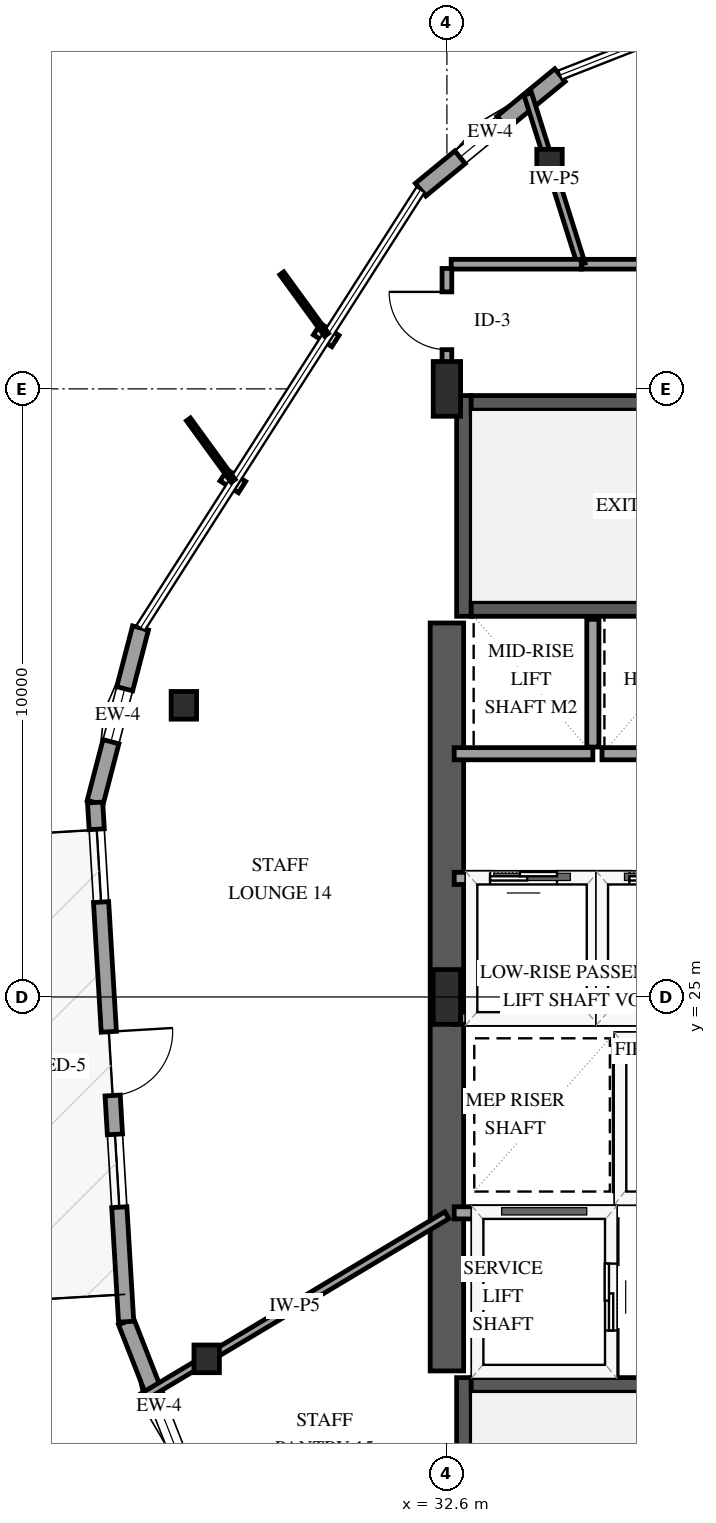
"""IFC4 building model, lengths in metres.
Left out: names, types, materials, properties, quantities, classifications, styles, units other than length and angle.
Written with IfcOpenShell. Run it as: python <this file> out.ifc"""

import sys

from ifc_helpers import new_model, si_unit, direction, frame, frame_2d, origin, origin_2d, place, context, subcontext, project, spatial, rectangle, i_section, extrude, element, fill, save


model = new_model("IFC4")
c1 = context("Model", 3, precision=1e-05, world=origin(), true_north=direction((0.0, 1.0)))
c2 = subcontext(c1, "Body", "Model", "MODEL_VIEW")
j1 = project(units=[si_unit("LENGTHUNIT", "METRE"), si_unit("PLANEANGLEUNIT", "RADIAN")], contexts=[c1])
p1 = place(None, origin())
s1 = spatial("IfcSite", under=j1, at=p1, CompositionType="ELEMENT")
p2 = place(p1, origin())
s2 = spatial("IfcBuilding", under=s1, at=p2, CompositionType="ELEMENT")
p3 = place(p2, frame((0.0, 0.0, 110.8)))
s3 = spatial("IfcBuildingStorey", under=s2, at=p3, CompositionType="ELEMENT", Elevation=110.8)
p4 = place(p3, frame((32.88, 15.11, 0.0), z_axis=(0.0, 0.0, 1.0), x_axis=(0.0, 1.0, 0.0)))
e1 = element("IfcWall", 1, at=p4, inside=s3, PredefinedType="SHEAR", context=c2, shape_type="SweptSolid", body=[
    extrude(rectangle(XDim=3.63, YDim=0.24, at=frame_2d((1.815, 0.0))), origin(), (0.0, 0.0, 1.0), 3.9),
])
p5 = place(p3, frame((33.0, 18.62, 0.0), z_axis=(0.0, 0.0, 1.0), x_axis=(1.0, 0.0, 0.0)))
e2 = element("IfcWall", 2, at=p5, inside=s3, PredefinedType="SHEAR", context=c2, shape_type="SweptSolid", body=[
    extrude(rectangle(XDim=8.0, YDim=0.24, at=frame_2d((4.0, 0.0))), origin(), (0.0, 0.0, 1.0), 3.9),
])
p6 = place(p3, frame((32.88, 31.26, 0.0), z_axis=(0.0, 0.0, 1.0), x_axis=(0.0, 1.0, 0.0)))
e3 = element("IfcWall", 3, at=p6, inside=s3, PredefinedType="SHEAR", context=c2, shape_type="SweptSolid", body=[
    extrude(rectangle(XDim=3.63, YDim=0.24, at=frame_2d((1.815, 0.0))), origin(), (0.0, 0.0, 1.0), 3.9),
])
for number, where, z_axis, x_axis in (
    (4, (33.0, 31.38, 0.0), (0.0, 0.0, 1.0), (1.0, 0.0, 0.0)),
    (5, (33.0, 34.77, 0.0), (0.0, 0.0, 1.0), (1.0, 0.0, 0.0)),
):
    element("IfcWall", number, at=place(p3, frame(where, z_axis=z_axis, x_axis=x_axis)), inside=s3, PredefinedType="SHEAR", context=c2, shape_type="SweptSolid", body=[
        extrude(rectangle(XDim=8.0, YDim=0.24, at=frame_2d((4.0, 0.0))), origin(), (0.0, 0.0, 1.0), 3.9),
    ])
p7 = place(p3, frame((32.6, 18.85, 0.0), z_axis=(0.0, 0.0, 1.0), x_axis=(0.0, 1.0, 0.0)))
e6 = element("IfcWall", 6, at=p7, inside=s3, PredefinedType="SHEAR", context=c2, shape_type="SweptSolid", body=[
    extrude(rectangle(XDim=12.3, YDim=0.55, at=frame_2d((6.15, 0.0))), origin(), (0.0, 0.0, 1.0), 3.9),
])
for number, where, z_axis, x_axis in (
    (7, (32.6, 25.0, 0.0), (0.0, 0.0, 1.0), (1.0, 0.0, 0.0)),
    (8, (32.6, 35.0, 0.0), (0.0, 0.0, 1.0), (1.0, 0.0, 0.0)),
):
    element("IfcColumn", number, at=place(p3, frame(where, z_axis=z_axis, x_axis=x_axis)), inside=s3, PredefinedType="PILASTER", context=c2, shape_type="SweptSolid", body=[
        extrude(rectangle(XDim=0.45, YDim=0.9, at=origin_2d()), origin(), (0.0, 0.0, 1.0), 3.9),
    ])
for number, where, z_axis, x_axis in (
    (9, (34.288, 38.711, 0.0), (0.0, 0.0, 1.0), (1.0, 0.0, 0.0)),
    (10, (28.274, 29.796, 0.0), (0.0, 0.0, 1.0), (1.0, 0.0, 0.0)),
    (11, (28.649, 19.049, 0.0), (0.0, 0.0, 1.0), (1.0, 0.0, 0.0)),
):
    element("IfcColumn", number, at=place(p3, frame(where, z_axis=z_axis, x_axis=x_axis)), inside=s3, PredefinedType="COLUMN", context=c2, shape_type="SweptSolid", body=[
        extrude(i_section(OverallWidth=0.418, OverallDepth=0.455, WebThickness=0.042, FlangeThickness=0.068, FilletRadius=0.038, at=origin_2d()), origin(), (0.0, 0.0, 1.0), 3.9),
    ])
p8 = place(p3, frame((34.459, 40.16, 0.0), z_axis=(0.0, 0.0, 1.0), x_axis=(-0.772514297214, -0.634997370545, 0.0)))
e12 = element("IfcWall", 12, at=p8, inside=s3, PredefinedType="SOLIDWALL", context=c2, shape_type="SweptSolid", body=[
    extrude(rectangle(XDim=2.967, YDim=0.27, at=frame_2d((1.483, 0.0))), origin(), (0.0, 0.0, 1.0), 2.979),
])
p9 = place(p8, frame((1.228, 0.0, 0.75)))
e13 = element("IfcOpeningElement", 13, at=p9, cuts=e12, PredefinedType="OPENING", context=c2, shape_type="SweptSolid", body=[
    extrude(rectangle(XDim=0.9, YDim=1.5, at=frame_2d((0.45, 0.75))), frame((0.0, 0.145, 0.0), z_axis=(0.0, -1.0, 0.0), x_axis=(1.0, 0.0, 0.0)), (0.0, 0.0, 1.0), 0.29),
])
p10 = place(p3, frame((27.562, 31.069, 0.0), z_axis=(0.0, 0.0, 1.0), x_axis=(-0.251741768545, -0.967794442002, 0.0)))
e14 = element("IfcWall", 14, at=p10, inside=s3, PredefinedType="SOLIDWALL", context=c2, shape_type="SweptSolid", body=[
    extrude(rectangle(XDim=2.967, YDim=0.27, at=frame_2d((1.483, 0.0))), origin(), (0.0, 0.0, 1.0), 2.979),
])
p11 = place(p10, frame((1.033, 0.0, 0.75)))
e15 = element("IfcOpeningElement", 15, at=p11, cuts=e14, PredefinedType="OPENING", context=c2, shape_type="SweptSolid", body=[
    extrude(rectangle(XDim=0.9, YDim=1.5, at=frame_2d((0.45, 0.75))), frame((0.0, 0.145, 0.0), z_axis=(0.0, -1.0, 0.0), x_axis=(1.0, 0.0, 0.0)), (0.0, 0.0, 1.0), 0.29),
])
p12 = place(p3, frame((27.325, 19.659, 0.0), z_axis=(0.0, 0.0, 1.0), x_axis=(0.365224582411, -0.93091944034, 0.0)))
e16 = element("IfcWall", 16, at=p12, inside=s3, PredefinedType="SOLIDWALL", context=c2, shape_type="SweptSolid", body=[
    extrude(rectangle(XDim=2.967, YDim=0.27, at=frame_2d((1.483, 0.0))), origin(), (0.0, 0.0, 1.0), 2.979),
])
p13 = place(p12, frame((1.519, 0.0, 0.75)))
e17 = element("IfcOpeningElement", 17, at=p13, cuts=e16, PredefinedType="OPENING", context=c2, shape_type="SweptSolid", body=[
    extrude(rectangle(XDim=0.9, YDim=1.5, at=frame_2d((0.45, 0.75))), frame((0.0, 0.145, 0.0), z_axis=(0.0, -1.0, 0.0), x_axis=(1.0, 0.0, 0.0)), (0.0, 0.0, 1.0), 0.29),
])
p14 = place(p3, frame((26.815, 28.198, 0.0), z_axis=(0.0, 0.0, 1.0), x_axis=(0.059655660005, -0.998219015161, 0.0)))
e18 = element("IfcWall", 18, at=p14, inside=s3, PredefinedType="SOLIDWALL", context=c2, shape_type="SweptSolid", body=[
    extrude(rectangle(XDim=8.553, YDim=0.25, at=frame_2d((4.277, 0.0))), origin(), (0.0, 0.0, 1.0), 2.979),
])
p15 = place(p14, frame((3.777, 0.0, 0.0)))
e19 = element("IfcOpeningElement", 19, at=p15, cuts=e18, PredefinedType="OPENING", context=c2, shape_type="SweptSolid", body=[
    extrude(rectangle(XDim=1.05, YDim=2.15, at=frame_2d((0.525, 1.075))), frame((0.0, 0.135, 0.0), z_axis=(0.0, -1.0, 0.0), x_axis=(1.0, 0.0, 0.0)), (0.0, 0.0, 1.0), 0.27),
])
p16 = place(p14, frame((0.44, 0.0, 0.72)))
e20 = element("IfcOpeningElement", 20, at=p16, cuts=e18, PredefinedType="OPENING", context=c2, shape_type="SweptSolid", body=[
    extrude(rectangle(XDim=1.2, YDim=1.6, at=frame_2d((0.6, 0.8))), frame((0.0, 0.135, 0.0), z_axis=(0.0, -1.0, 0.0), x_axis=(1.0, 0.0, 0.0)), (0.0, 0.0, 1.0), 0.27),
])
p17 = place(p14, frame((5.467, 0.0, 0.72)))
e21 = element("IfcOpeningElement", 21, at=p17, cuts=e18, PredefinedType="OPENING", context=c2, shape_type="SweptSolid", body=[
    extrude(rectangle(XDim=1.2, YDim=1.6, at=frame_2d((0.6, 0.8))), frame((0.0, 0.135, 0.0), z_axis=(0.0, -1.0, 0.0), x_axis=(1.0, 0.0, 0.0)), (0.0, 0.0, 1.0), 0.27),
])
p18 = place(p3, frame((35.45, 21.7, 0.0), z_axis=(0.0, 0.0, 1.0), x_axis=(1.0, 0.0, 0.0)))
e22 = element("IfcWall", 22, at=p18, inside=s3, PredefinedType="SOLIDWALL", context=c2, shape_type="SweptSolid", body=[
    extrude(rectangle(XDim=2.0, YDim=0.2, at=frame_2d((1.0, 0.0))), origin(), (0.0, 0.0, 1.0), 3.6),
])
p19 = place(p18, frame((0.45, 0.0, 0.0)))
e23 = element("IfcOpeningElement", 23, at=p19, cuts=e22, PredefinedType="OPENING", context=c2, shape_type="SweptSolid", body=[
    extrude(rectangle(XDim=1.1, YDim=2.15, at=frame_2d((0.55, 1.075))), frame((0.0, 0.11, 0.0), z_axis=(0.0, -1.0, 0.0), x_axis=(1.0, 0.0, 0.0)), (0.0, 0.0, 1.0), 0.22),
])
p20 = place(p3, frame((35.45, 24.3, 0.0), z_axis=(0.0, 0.0, 1.0), x_axis=(1.0, 0.0, 0.0)))
e24 = element("IfcWall", 24, at=p20, inside=s3, PredefinedType="SOLIDWALL", context=c2, shape_type="SweptSolid", body=[
    extrude(rectangle(XDim=2.0, YDim=0.2, at=frame_2d((1.0, 0.0))), origin(), (0.0, 0.0, 1.0), 3.6),
])
p21 = place(p3, frame((35.45, 21.81, 0.0), z_axis=(0.0, 0.0, 1.0), x_axis=(0.0, 1.0, 0.0)))
e25 = element("IfcWall", 25, at=p21, inside=s3, PredefinedType="SOLIDWALL", context=c2, shape_type="SweptSolid", body=[
    extrude(rectangle(XDim=2.38, YDim=0.2, at=frame_2d((1.19, 0.0))), origin(), (0.0, 0.0, 1.0), 3.6),
])
p22 = place(p3, frame((32.72, 21.45, 0.0), z_axis=(0.0, 0.0, 1.0), x_axis=(1.0, 0.0, 0.0)))
e26 = element("IfcWall", 26, at=p22, inside=s3, PredefinedType="SOLIDWALL", context=c2, shape_type="SweptSolid", body=[
    extrude(rectangle(XDim=2.58, YDim=0.2, at=frame_2d((1.29, 0.0))), origin(), (0.0, 0.0, 1.0), 3.6),
])
p23 = place(p3, frame((35.3, 18.79, 0.0), z_axis=(0.0, 0.0, 1.0), x_axis=(0.0, 1.0, 0.0)))
e27 = element("IfcWall", 27, at=p23, inside=s3, PredefinedType="SOLIDWALL", context=c2, shape_type="SweptSolid", body=[
    extrude(rectangle(XDim=2.55, YDim=0.2, at=frame_2d((1.275, 0.0))), origin(), (0.0, 0.0, 1.0), 3.6),
])
p24 = place(p23, frame((0.725, 0.0, 0.0)))
e28 = element("IfcOpeningElement", 28, at=p24, cuts=e27, PredefinedType="OPENING", context=c2, shape_type="SweptSolid", body=[
    extrude(rectangle(XDim=1.1, YDim=2.15, at=frame_2d((0.55, 1.075))), frame((0.0, 0.11, 0.0), z_axis=(0.0, -1.0, 0.0), x_axis=(1.0, 0.0, 0.0)), (0.0, 0.0, 1.0), 0.22),
])
p25 = place(p3, frame((32.72, 24.65, 0.0), z_axis=(0.0, 0.0, 1.0), x_axis=(1.0, 0.0, 0.0)))
e29 = element("IfcWall", 29, at=p25, inside=s3, PredefinedType="SOLIDWALL", context=c2, shape_type="SweptSolid", body=[
    extrude(rectangle(XDim=2.28, YDim=0.2, at=frame_2d((1.14, 0.0))), origin(), (0.0, 0.0, 1.0), 3.6),
])
p26 = place(p3, frame((32.72, 26.95, 0.0), z_axis=(0.0, 0.0, 1.0), x_axis=(1.0, 0.0, 0.0)))
e30 = element("IfcWall", 30, at=p26, inside=s3, PredefinedType="SOLIDWALL", context=c2, shape_type="SweptSolid", body=[
    extrude(rectangle(XDim=2.28, YDim=0.2, at=frame_2d((1.14, 0.0))), origin(), (0.0, 0.0, 1.0), 3.6),
])
p27 = place(p26, frame((0.59, 0.0, 0.0)))
e31 = element("IfcOpeningElement", 31, at=p27, cuts=e30, PredefinedType="OPENING", context=c2, shape_type="SweptSolid", body=[
    extrude(rectangle(XDim=1.1, YDim=2.15, at=frame_2d((0.55, 1.075))), frame((0.0, 0.11, 0.0), z_axis=(0.0, -1.0, 0.0), x_axis=(1.0, 0.0, 0.0)), (0.0, 0.0, 1.0), 0.22),
])
p28 = place(p3, frame((35.0, 24.76, 0.0), z_axis=(0.0, 0.0, 1.0), x_axis=(0.0, 1.0, 0.0)))
e32 = element("IfcWall", 32, at=p28, inside=s3, PredefinedType="SOLIDWALL", context=c2, shape_type="SweptSolid", body=[
    extrude(rectangle(XDim=2.08, YDim=0.2, at=frame_2d((1.04, 0.0))), origin(), (0.0, 0.0, 1.0), 3.6),
])
p29 = place(p3, frame((35.15, 24.65, 0.0), z_axis=(0.0, 0.0, 1.0), x_axis=(1.0, 0.0, 0.0)))
e33 = element("IfcWall", 33, at=p29, inside=s3, PredefinedType="SOLIDWALL", context=c2, shape_type="SweptSolid", body=[
    extrude(rectangle(XDim=2.0, YDim=0.2, at=frame_2d((1.0, 0.0))), origin(), (0.0, 0.0, 1.0), 3.6),
])
p30 = place(p3, frame((35.15, 26.95, 0.0), z_axis=(0.0, 0.0, 1.0), x_axis=(1.0, 0.0, 0.0)))
e34 = element("IfcWall", 34, at=p30, inside=s3, PredefinedType="SOLIDWALL", context=c2, shape_type="SweptSolid", body=[
    extrude(rectangle(XDim=2.0, YDim=0.2, at=frame_2d((1.0, 0.0))), origin(), (0.0, 0.0, 1.0), 3.6),
])
p31 = place(p30, frame((0.45, 0.0, 0.0)))
e35 = element("IfcOpeningElement", 35, at=p31, cuts=e34, PredefinedType="OPENING", context=c2, shape_type="SweptSolid", body=[
    extrude(rectangle(XDim=1.1, YDim=2.15, at=frame_2d((0.55, 1.075))), frame((0.0, 0.11, 0.0), z_axis=(0.0, -1.0, 0.0), x_axis=(1.0, 0.0, 0.0)), (0.0, 0.0, 1.0), 0.22),
])
p32 = place(p3, frame((32.72, 29.0, 0.0), z_axis=(0.0, 0.0, 1.0), x_axis=(1.0, 0.0, 0.0)))
e36 = element("IfcWall", 36, at=p32, inside=s3, PredefinedType="SOLIDWALL", context=c2, shape_type="SweptSolid", body=[
    extrude(rectangle(XDim=2.28, YDim=0.2, at=frame_2d((1.14, 0.0))), origin(), (0.0, 0.0, 1.0), 3.6),
])
p33 = place(p3, frame((35.0, 29.11, 0.0), z_axis=(0.0, 0.0, 1.0), x_axis=(0.0, 1.0, 0.0)))
e37 = element("IfcWall", 37, at=p33, inside=s3, PredefinedType="SOLIDWALL", context=c2, shape_type="SweptSolid", body=[
    extrude(rectangle(XDim=2.1, YDim=0.2, at=frame_2d((1.05, 0.0))), origin(), (0.0, 0.0, 1.0), 3.6),
])
p34 = place(p3, frame((35.15, 29.0, 0.0), z_axis=(0.0, 0.0, 1.0), x_axis=(1.0, 0.0, 0.0)))
e38 = element("IfcWall", 38, at=p34, inside=s3, PredefinedType="SOLIDWALL", context=c2, shape_type="SweptSolid", body=[
    extrude(rectangle(XDim=2.0, YDim=0.2, at=frame_2d((1.0, 0.0))), origin(), (0.0, 0.0, 1.0), 3.6),
])
p35 = place(p3, frame((32.6, 21.411, 0.0), z_axis=(0.0, 0.0, 1.0), x_axis=(-0.858275512682, -0.513189189608, 0.0)))
e39 = element("IfcWall", 39, at=p35, inside=s3, PredefinedType="PARTITIONING", context=c2, shape_type="SweptSolid", body=[
    extrude(rectangle(XDim=5.828, YDim=0.13, at=frame_2d((2.914, 0.0))), origin(), (0.0, 0.0, 1.0), 2.978),
])
p36 = place(p3, frame((34.81, 37.05, 0.0), z_axis=(0.0, 0.0, 1.0), x_axis=(1.0, 0.0, 0.0)))
e40 = element("IfcWall", 40, at=p36, inside=s3, PredefinedType="PARTITIONING", context=c2, shape_type="SweptSolid", body=[
    extrude(rectangle(XDim=3.514, YDim=0.16, at=frame_2d((1.757, 0.0))), origin(), (0.0, 0.0, 1.0), 3.6),
])
p37 = place(p36, frame((1.282, 0.0, 0.0)))
e41 = element("IfcOpeningElement", 41, at=p37, cuts=e40, PredefinedType="OPENING", context=c2, shape_type="SweptSolid", body=[
    extrude(rectangle(XDim=0.95, YDim=2.15, at=frame_2d((0.475, 1.075))), frame((0.0, 0.09, 0.0), z_axis=(0.0, -1.0, 0.0), x_axis=(1.0, 0.0, 0.0)), (0.0, 0.0, 1.0), 0.18),
])
p38 = place(p3, frame((34.81, 37.05, 0.0), z_axis=(0.0, 0.0, 1.0), x_axis=(-0.299956409632, 0.953952908859, 0.0)))
e42 = element("IfcWall", 42, at=p38, inside=s3, PredefinedType="PARTITIONING", context=c2, shape_type="SweptSolid", body=[
    extrude(rectangle(XDim=2.934, YDim=0.13, at=frame_2d((1.467, 0.0))), origin(), (0.0, 0.0, 1.0), 2.895),
])
p39 = place(p3, frame((32.67, 37.05, 0.0), z_axis=(0.0, 0.0, 1.0), x_axis=(1.0, 0.0, 0.0)))
e43 = element("IfcWall", 43, at=p39, inside=s3, PredefinedType="PARTITIONING", context=c2, shape_type="SweptSolid", body=[
    extrude(rectangle(XDim=2.14, YDim=0.16, at=frame_2d((1.07, 0.0))), origin(), (0.0, 0.0, 1.0), 3.6),
])
p40 = place(p3, frame((32.6, 35.07, 0.0), z_axis=(0.0, 0.0, 1.0), x_axis=(0.0, 1.0, 0.0)))
e44 = element("IfcWall", 44, at=p40, inside=s3, PredefinedType="PARTITIONING", context=c2, shape_type="SweptSolid", body=[
    extrude(rectangle(XDim=1.91, YDim=0.16, at=frame_2d((0.955, 0.0))), origin(), (0.0, 0.0, 1.0), 3.6),
])
p41 = place(p40, frame((0.575, 0.0, 0.0)))
e45 = element("IfcOpeningElement", 45, at=p41, cuts=e44, PredefinedType="OPENING", context=c2, shape_type="SweptSolid", body=[
    extrude(rectangle(XDim=0.95, YDim=2.15, at=frame_2d((0.475, 1.075))), frame((0.0, 0.09, 0.0), z_axis=(0.0, -1.0, 0.0), x_axis=(1.0, 0.0, 0.0)), (0.0, 0.0, 1.0), 0.18),
])
p42 = place(p9, origin())
e46 = element("IfcWindow", 46, at=p42, inside=s3, PartitioningType="SINGLE_PANEL", PredefinedType="WINDOW", context=c2, shape_type="SweptSolid", body=[
    extrude(rectangle(XDim=0.9, YDim=1.5, at=frame_2d((0.45, 0.75))), frame((0.0, 0.03, 0.0), z_axis=(0.0, -1.0, 0.0), x_axis=(1.0, 0.0, 0.0)), (0.0, 0.0, 1.0), 0.06),
])
fill(e13, e46)
p43 = place(p11, origin())
e47 = element("IfcWindow", 47, at=p43, inside=s3, PartitioningType="SINGLE_PANEL", PredefinedType="WINDOW", context=c2, shape_type="SweptSolid", body=[
    extrude(rectangle(XDim=0.9, YDim=1.5, at=frame_2d((0.45, 0.75))), frame((0.0, 0.03, 0.0), z_axis=(0.0, -1.0, 0.0), x_axis=(1.0, 0.0, 0.0)), (0.0, 0.0, 1.0), 0.06),
])
fill(e15, e47)
p44 = place(p13, origin())
e48 = element("IfcWindow", 48, at=p44, inside=s3, PartitioningType="SINGLE_PANEL", PredefinedType="WINDOW", context=c2, shape_type="SweptSolid", body=[
    extrude(rectangle(XDim=0.9, YDim=1.5, at=frame_2d((0.45, 0.75))), frame((0.0, 0.03, 0.0), z_axis=(0.0, -1.0, 0.0), x_axis=(1.0, 0.0, 0.0)), (0.0, 0.0, 1.0), 0.06),
])
fill(e17, e48)
p45 = place(p15, origin())
e49 = element("IfcDoor", 49, at=p45, inside=s3, OperationType="SINGLE_SWING_LEFT", PredefinedType="DOOR", context=c2, shape_type="SweptSolid", body=[
    extrude(rectangle(XDim=1.05, YDim=2.15, at=frame_2d((0.525, 1.075))), frame((0.0, 0.025, 0.0), z_axis=(0.0, -1.0, 0.0), x_axis=(1.0, 0.0, 0.0)), (0.0, 0.0, 1.0), 0.05),
])
fill(e19, e49)
p46 = place(p16, origin())
e50 = element("IfcWindow", 50, at=p46, inside=s3, PartitioningType="SINGLE_PANEL", PredefinedType="WINDOW", context=c2, shape_type="SweptSolid", body=[
    extrude(rectangle(XDim=1.2, YDim=1.6, at=frame_2d((0.6, 0.8))), frame((0.0, 0.03, 0.0), z_axis=(0.0, -1.0, 0.0), x_axis=(1.0, 0.0, 0.0)), (0.0, 0.0, 1.0), 0.06),
])
fill(e20, e50)
p47 = place(p17, origin())
e51 = element("IfcWindow", 51, at=p47, inside=s3, PartitioningType="SINGLE_PANEL", PredefinedType="WINDOW", context=c2, shape_type="SweptSolid", body=[
    extrude(rectangle(XDim=1.2, YDim=1.6, at=frame_2d((0.6, 0.8))), frame((0.0, 0.03, 0.0), z_axis=(0.0, -1.0, 0.0), x_axis=(1.0, 0.0, 0.0)), (0.0, 0.0, 1.0), 0.06),
])
fill(e21, e51)
p48 = place(p24, origin())
e52 = element("IfcDoor", 52, at=p48, inside=s3, OperationType="SLIDING_TO_LEFT", PredefinedType="DOOR", context=c2, shape_type="SweptSolid", body=[
    extrude(rectangle(XDim=1.1, YDim=2.15, at=frame_2d((0.55, 1.075))), frame((0.0, 0.025, 0.0), z_axis=(0.0, -1.0, 0.0), x_axis=(1.0, 0.0, 0.0)), (0.0, 0.0, 1.0), 0.05),
])
fill(e28, e52)
p49 = place(p27, origin())
e53 = element("IfcDoor", 53, at=p49, inside=s3, OperationType="SLIDING_TO_LEFT", PredefinedType="DOOR", context=c2, shape_type="SweptSolid", body=[
    extrude(rectangle(XDim=1.1, YDim=2.15, at=frame_2d((0.55, 1.075))), frame((0.0, 0.025, 0.0), z_axis=(0.0, -1.0, 0.0), x_axis=(1.0, 0.0, 0.0)), (0.0, 0.0, 1.0), 0.05),
])
fill(e31, e53)
p50 = place(p31, origin())
e54 = element("IfcDoor", 54, at=p50, inside=s3, OperationType="SLIDING_TO_LEFT", PredefinedType="DOOR", context=c2, shape_type="SweptSolid", body=[
    extrude(rectangle(XDim=1.1, YDim=2.15, at=frame_2d((0.55, 1.075))), frame((0.0, 0.025, 0.0), z_axis=(0.0, -1.0, 0.0), x_axis=(1.0, 0.0, 0.0)), (0.0, 0.0, 1.0), 0.05),
])
fill(e35, e54)
p51 = place(p41, origin())
e55 = element("IfcDoor", 55, at=p51, inside=s3, OperationType="SINGLE_SWING_RIGHT", PredefinedType="DOOR", context=c2, shape_type="SweptSolid", body=[
    extrude(rectangle(XDim=0.95, YDim=2.15, at=frame_2d((0.475, 1.075))), frame((0.0, 0.025, 0.0), z_axis=(0.0, -1.0, 0.0), x_axis=(1.0, 0.0, 0.0)), (0.0, 0.0, 1.0), 0.05),
])
fill(e45, e55)
save(model, sys.argv[1])
